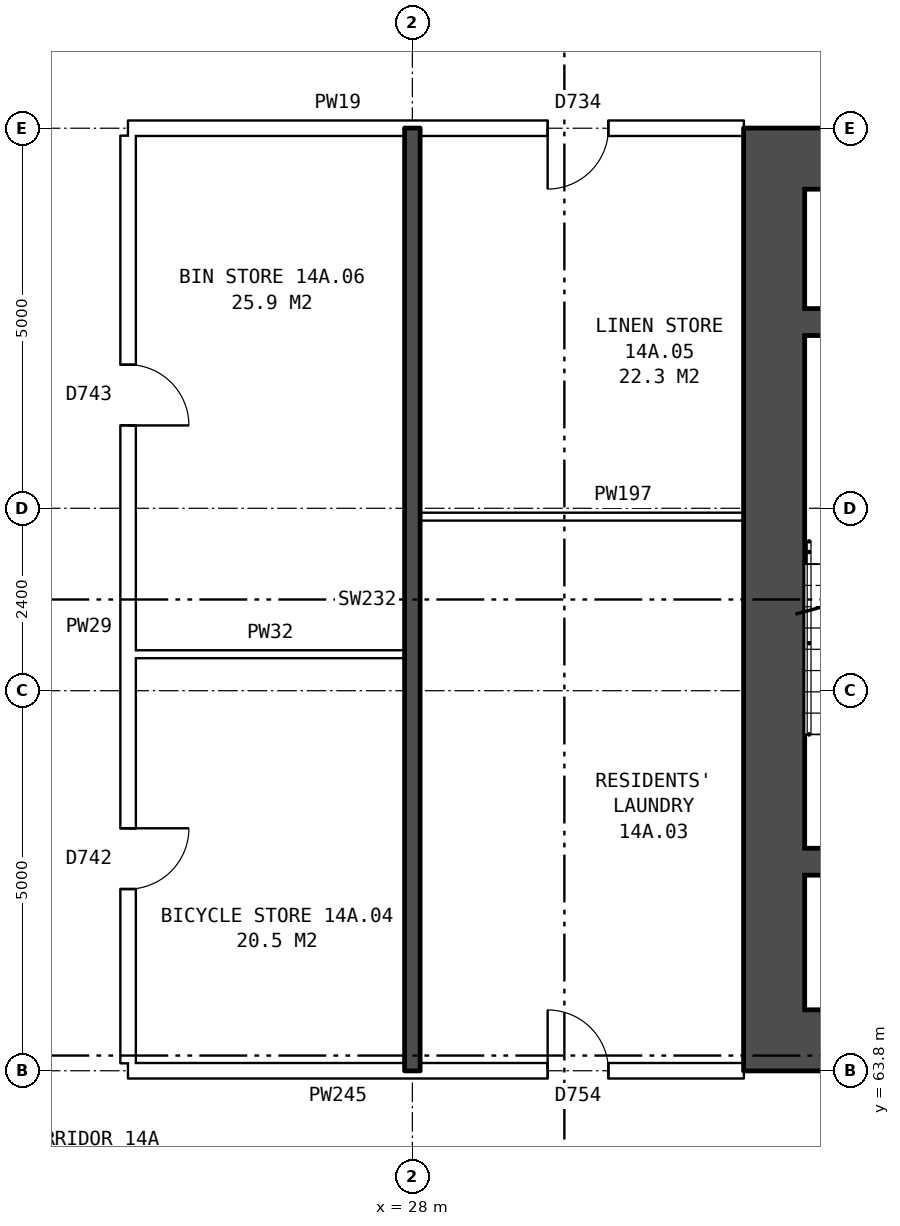
"""IFC4 building model, lengths in metres.
Left out: names, types, materials, properties, quantities, classifications, styles, units other than length and angle.
Written with IfcOpenShell. Run it as: python <this file> out.ifc"""

import sys

from ifc_helpers import new_model, si_unit, direction, frame, frame_2d, origin, place, context, subcontext, project, spatial, rectangle, extrude, element, fill, save


model = new_model("IFC4")
c1 = context("Model", 3, precision=1e-05, world=origin(), true_north=direction((0.0, 1.0)))
c2 = subcontext(c1, "Body", "Model", "MODEL_VIEW")
j1 = project(units=[si_unit("LENGTHUNIT", "METRE"), si_unit("PLANEANGLEUNIT", "RADIAN")], contexts=[c1])
p1 = place(None, origin())
s1 = spatial("IfcSite", under=j1, at=p1, CompositionType="ELEMENT")
p2 = place(p1, origin())
s2 = spatial("IfcBuilding", under=s1, at=p2, CompositionType="ELEMENT")
p3 = place(p2, frame((0.0, 0.0, 53.6)))
s3 = spatial("IfcBuildingStorey", under=s2, at=p3, CompositionType="ELEMENT", Elevation=53.6)
p4 = place(p3, frame((32.76, 75.4, 0.0), z_axis=(0.0, 0.0, 1.0), x_axis=(0.0, -1.0, 0.0)))
e1 = element("IfcWall", 1, at=p4, inside=s3, PredefinedType="SHEAR", context=c2, shape_type="SweptSolid", body=[
    extrude(rectangle(XDim=10.8, YDim=0.8, at=frame_2d((5.4, 0.0))), origin(), (0.0, 0.0, 1.0), 2.85),
])
for number, where, z_axis, x_axis in (
    (2, (41.36, 75.8, 0.0), (0.0, 0.0, 1.0), (-1.0, 0.0, 0.0)),
    (3, (41.36, 64.2, 0.0), (0.0, 0.0, 1.0), (-1.0, 0.0, 0.0)),
):
    element("IfcWall", number, at=place(p3, frame(where, z_axis=z_axis, x_axis=x_axis)), inside=s3, PredefinedType="SHEAR", context=c2, shape_type="SweptSolid", body=[
        extrude(rectangle(XDim=9.0, YDim=0.8, at=frame_2d((4.5, 0.0))), origin(), (0.0, 0.0, 1.0), 2.85),
    ])
p5 = place(p3, frame((36.185, 73.65, 0.0), z_axis=(0.0, 0.0, 1.0), x_axis=(-1.0, 0.0, 0.0)))
e4 = element("IfcWall", 4, at=p5, inside=s3, PredefinedType="SHEAR", context=c2, shape_type="SweptSolid", body=[
    extrude(rectangle(XDim=3.025, YDim=0.35, at=frame_2d((1.513, 0.0))), origin(), (0.0, 0.0, 1.0), 2.85),
])
p6 = place(p3, frame((36.185, 66.55, 0.0), z_axis=(0.0, 0.0, 1.0), x_axis=(-1.0, 0.0, 0.0)))
e5 = element("IfcWall", 5, at=p6, inside=s3, PredefinedType="SHEAR", context=c2, shape_type="SweptSolid", body=[
    extrude(rectangle(XDim=3.025, YDim=0.35, at=frame_2d((1.513, 0.0))), origin(), (0.0, 0.0, 1.0), 2.85),
])
p7 = place(p6, frame((0.195, 0.0, 0.0)))
e6 = element("IfcOpeningElement", 6, at=p7, cuts=e5, PredefinedType="OPENING", context=c2, shape_type="SweptSolid", body=[
    extrude(rectangle(XDim=1.1, YDim=2.1, at=frame_2d((0.55, 1.05))), frame((0.0, 0.185, 0.0), z_axis=(0.0, -1.0, 0.0), x_axis=(1.0, 0.0, 0.0)), (0.0, 0.0, 1.0), 0.37),
])
p8 = place(p3, frame((24.26, 63.8, 0.0), z_axis=(0.0, 0.0, 1.0), x_axis=(1.0, 0.0, 0.0)))
e7 = element("IfcWall", 7, at=p8, inside=s3, PredefinedType="PARTITIONING", context=c2, shape_type="SweptSolid", body=[
    extrude(rectangle(XDim=8.1, YDim=0.2, at=frame_2d((4.05, 0.0))), origin(), (0.0, 0.0, 1.0), 2.85),
])
p9 = place(p8, frame((5.52, 0.0, 0.0)))
e8 = element("IfcOpeningElement", 8, at=p9, cuts=e7, PredefinedType="OPENING", context=c2, shape_type="SweptSolid", body=[
    extrude(rectangle(XDim=0.8, YDim=2.1, at=frame_2d((0.4, 1.05))), frame((0.0, 0.11, 0.0), z_axis=(0.0, -1.0, 0.0), x_axis=(1.0, 0.0, 0.0)), (0.0, 0.0, 1.0), 0.22),
])
p10 = place(p3, frame((24.36, 69.28, 0.0), z_axis=(0.0, 0.0, 1.0), x_axis=(1.0, 0.0, 0.0)))
e9 = element("IfcWall", 9, at=p10, inside=s3, PredefinedType="PARTITIONING", context=c2, shape_type="SweptSolid", body=[
    extrude(rectangle(XDim=3.54, YDim=0.1, at=frame_2d((1.77, 0.0))), origin(), (0.0, 0.0, 1.0), 2.85),
])
p11 = place(p3, frame((28.1, 71.09, 0.0), z_axis=(0.0, 0.0, 1.0), x_axis=(1.0, 0.0, 0.0)))
e10 = element("IfcWall", 10, at=p11, inside=s3, PredefinedType="PARTITIONING", context=c2, shape_type="SweptSolid", body=[
    extrude(rectangle(XDim=4.26, YDim=0.1, at=frame_2d((2.13, 0.0))), origin(), (0.0, 0.0, 1.0), 2.85),
])
p12 = place(p3, frame((24.26, 76.2, 0.0), z_axis=(0.0, 0.0, 1.0), x_axis=(1.0, 0.0, 0.0)))
e11 = element("IfcWall", 11, at=p12, inside=s3, PredefinedType="PARTITIONING", context=c2, shape_type="SweptSolid", body=[
    extrude(rectangle(XDim=8.1, YDim=0.2, at=frame_2d((4.05, 0.0))), origin(), (0.0, 0.0, 1.0), 2.85),
])
p13 = place(p12, frame((5.52, 0.0, 0.0)))
e12 = element("IfcOpeningElement", 12, at=p13, cuts=e11, PredefinedType="OPENING", context=c2, shape_type="SweptSolid", body=[
    extrude(rectangle(XDim=0.8, YDim=2.1, at=frame_2d((0.4, 1.05))), frame((0.0, 0.11, 0.0), z_axis=(0.0, -1.0, 0.0), x_axis=(1.0, 0.0, 0.0)), (0.0, 0.0, 1.0), 0.22),
])
p14 = place(p3, frame((24.26, 63.9, 0.0), z_axis=(0.0, 0.0, 1.0), x_axis=(0.0, 1.0, 0.0)))
e13 = element("IfcWall", 13, at=p14, inside=s3, PredefinedType="PARTITIONING", context=c2, shape_type="SweptSolid", body=[
    extrude(rectangle(XDim=12.2, YDim=0.2, at=frame_2d((6.1, 0.0))), origin(), (0.0, 0.0, 1.0), 2.85),
])
p15 = place(p14, frame((2.29, 0.0, 0.0)))
e14 = element("IfcOpeningElement", 14, at=p15, cuts=e13, PredefinedType="OPENING", context=c2, shape_type="SweptSolid", body=[
    extrude(rectangle(XDim=0.8, YDim=2.1, at=frame_2d((0.4, 1.05))), frame((0.0, 0.11, 0.0), z_axis=(0.0, -1.0, 0.0), x_axis=(1.0, 0.0, 0.0)), (0.0, 0.0, 1.0), 0.22),
])
p16 = place(p14, frame((8.39, 0.0, 0.0)))
e15 = element("IfcOpeningElement", 15, at=p16, cuts=e13, PredefinedType="OPENING", context=c2, shape_type="SweptSolid", body=[
    extrude(rectangle(XDim=0.8, YDim=2.1, at=frame_2d((0.4, 1.05))), frame((0.0, 0.11, 0.0), z_axis=(0.0, -1.0, 0.0), x_axis=(1.0, 0.0, 0.0)), (0.0, 0.0, 1.0), 0.22),
])
p17 = place(p3, frame((28.0, 63.8, 0.0), z_axis=(0.0, 0.0, 1.0), x_axis=(0.0, 1.0, 0.0)))
e16 = element("IfcWall", 16, at=p17, inside=s3, PredefinedType="SOLIDWALL", context=c2, shape_type="SweptSolid", body=[
    extrude(rectangle(XDim=12.4, YDim=0.2, at=frame_2d((6.2, 0.0))), origin(), (0.0, 0.0, 1.0), 2.85),
])
p18 = place(p9, origin())
e17 = element("IfcDoor", 17, at=p18, inside=s3, OperationType="SINGLE_SWING_LEFT", PredefinedType="DOOR", context=c2, shape_type="SweptSolid", body=[
    extrude(rectangle(XDim=0.8, YDim=2.1, at=frame_2d((0.4, 1.05))), frame((0.0, 0.025, 0.0), z_axis=(0.0, -1.0, 0.0), x_axis=(1.0, 0.0, 0.0)), (0.0, 0.0, 1.0), 0.05),
])
fill(e8, e17)
p19 = place(p15, frame((0.8, 0.0, 0.0), z_axis=(0.0, 0.0, 1.0), x_axis=(-1.0, 0.0, 0.0)))
e18 = element("IfcDoor", 18, at=p19, inside=s3, OperationType="SINGLE_SWING_LEFT", PredefinedType="DOOR", context=c2, shape_type="SweptSolid", body=[
    extrude(rectangle(XDim=0.8, YDim=2.1, at=frame_2d((0.4, 1.05))), frame((0.0, 0.025, 0.0), z_axis=(0.0, -1.0, 0.0), x_axis=(1.0, 0.0, 0.0)), (0.0, 0.0, 1.0), 0.05),
])
fill(e14, e18)
p20 = place(p13, frame((0.8, 0.0, 0.0), z_axis=(0.0, 0.0, 1.0), x_axis=(-1.0, 0.0, 0.0)))
e19 = element("IfcDoor", 19, at=p20, inside=s3, OperationType="SINGLE_SWING_RIGHT", PredefinedType="DOOR", context=c2, shape_type="SweptSolid", body=[
    extrude(rectangle(XDim=0.8, YDim=2.1, at=frame_2d((0.4, 1.05))), frame((0.0, 0.025, 0.0), z_axis=(0.0, -1.0, 0.0), x_axis=(1.0, 0.0, 0.0)), (0.0, 0.0, 1.0), 0.05),
])
fill(e12, e19)
p21 = place(p16, frame((0.8, 0.0, 0.0), z_axis=(0.0, 0.0, 1.0), x_axis=(-1.0, 0.0, 0.0)))
e20 = element("IfcDoor", 20, at=p21, inside=s3, OperationType="SINGLE_SWING_RIGHT", PredefinedType="DOOR", context=c2, shape_type="SweptSolid", body=[
    extrude(rectangle(XDim=0.8, YDim=2.1, at=frame_2d((0.4, 1.05))), frame((0.0, 0.025, 0.0), z_axis=(0.0, -1.0, 0.0), x_axis=(1.0, 0.0, 0.0)), (0.0, 0.0, 1.0), 0.05),
])
fill(e15, e20)
save(model, sys.argv[1])
